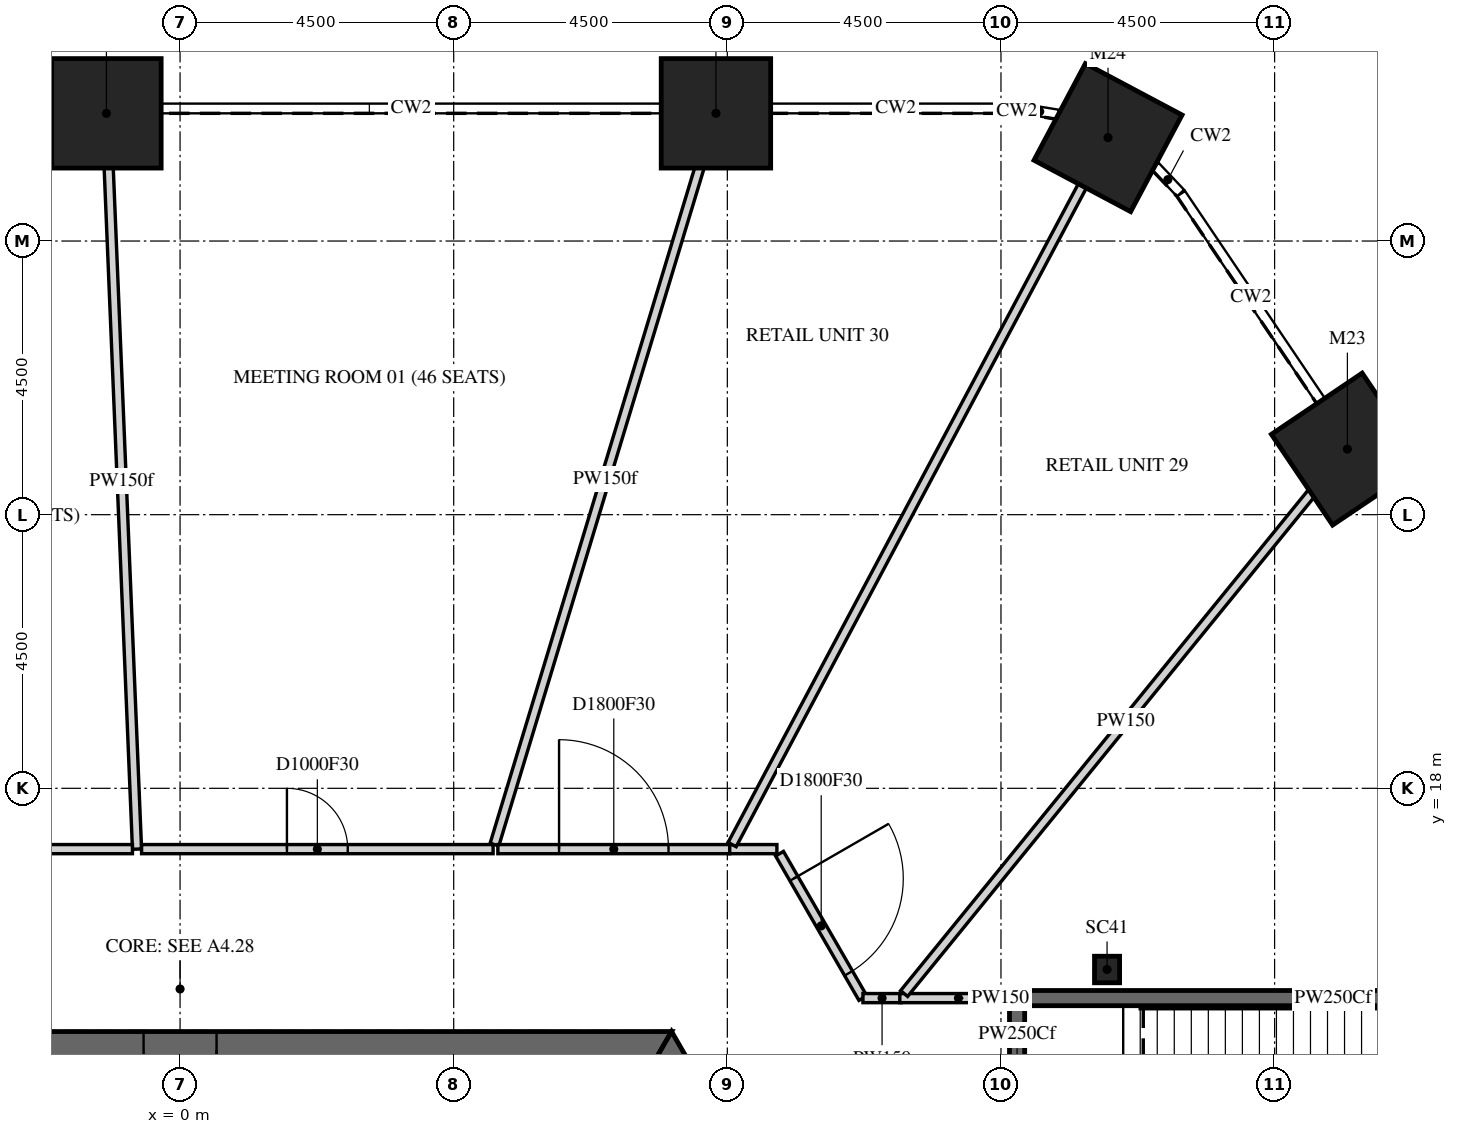
"""IFC4 building model, lengths in metres.
Left out: names, types, materials, properties, quantities, classifications, styles, units other than length and angle.
Written with IfcOpenShell. Run it as: python <this file> out.ifc"""

import sys

from ifc_helpers import new_model, si_unit, direction, frame, frame_2d, origin, origin_2d, place, context, subcontext, project, spatial, polyline, rectangle, i_section, outline, extrude, element, fill, save


model = new_model("IFC4")
c1 = context("Model", 3, precision=1e-05, world=origin(), true_north=direction((0.0, 1.0)))
c2 = subcontext(c1, "Body", "Model", "MODEL_VIEW")
j1 = project(units=[si_unit("LENGTHUNIT", "METRE"), si_unit("PLANEANGLEUNIT", "RADIAN")], contexts=[c1])
p1 = place(None, origin())
s1 = spatial("IfcSite", under=j1, at=p1, CompositionType="ELEMENT")
p2 = place(p1, origin())
s2 = spatial("IfcBuilding", under=s1, at=p2, CompositionType="ELEMENT")
p3 = place(p2, frame((0.0, 0.0, 15.0)))
s3 = spatial("IfcBuildingStorey", under=s2, at=p3, CompositionType="ELEMENT", Elevation=15.0)
for number, where, z_axis, x_axis in (
    (1, (8.812, 29.1, -0.25), (0.0, 0.0, 1.0), (1.0, 0.0, 0.0)),
    (2, (-1.211, 29.1, -0.25), (0.0, 0.0, 1.0), (1.0, 0.0, 0.0)),
    (3, (19.197, 23.579, -0.25), (0.0, 0.0, 1.0), (0.559, -0.829, 0.0)),
    (4, (15.26, 28.701, -0.25), (0.0, 0.0, 1.0), (0.883, -0.469, 0.0)),
):
    element("IfcColumn", number, at=place(p3, frame(where, z_axis=z_axis, x_axis=x_axis)), inside=s3, PredefinedType="COLUMN", context=c2, shape_type="SweptSolid", body=[
        extrude(rectangle(XDim=1.8, YDim=1.8, at=origin_2d()), origin(), (0.0, 0.0, 1.0), 5.5),
    ])
p4 = place(p3, frame((15.245, 15.02, -0.25), z_axis=(0.0, 0.0, 1.0), x_axis=(1.0, 0.0, 0.0)))
e5 = element("IfcColumn", 5, at=p4, inside=s3, PredefinedType="COLUMN", context=c2, shape_type="SweptSolid", body=[
    extrude(i_section(OverallWidth=0.412, OverallDepth=0.437, WebThickness=0.036, FlangeThickness=0.058, FilletRadius=0.015, at=origin_2d()), origin(), (0.0, 0.0, 1.0), 5.5),
])
p5 = place(p3, frame((15.819, 0.0, -0.25), z_axis=(0.0, 0.0, 1.0), x_axis=(-0.499999880136, 0.866025472988, 0.0)))
e6 = element("IfcWall", 6, at=p5, inside=s3, PredefinedType="SHEAR", context=c2, shape_type="SweptSolid", body=[
    extrude(outline(polyline([(-0.173, -0.3), (15.993, -0.3), (15.646, 0.3), (0.173, 0.3), (-0.173, -0.3)])), origin(), (0.0, 0.0, 1.0), 5.5),
])
p6 = place(p5, frame((6.981, 0.0, 0.25)))
e7 = element("IfcOpeningElement", 7, at=p6, cuts=e6, PredefinedType="OPENING", context=c2, shape_type="SweptSolid", body=[
    extrude(rectangle(XDim=1.8, YDim=2.4, at=frame_2d((0.9, 1.2))), frame((0.0, 0.31, 0.0), z_axis=(0.0, -1.0, 0.0), x_axis=(1.0, 0.0, 0.0)), (0.0, 0.0, 1.0), 0.62),
])
p7 = place(p3, frame((7.91, 13.7, -0.25), z_axis=(0.0, 0.0, 1.0), x_axis=(-1.0, 0.0, 0.0)))
e8 = element("IfcWall", 8, at=p7, inside=s3, PredefinedType="SHEAR", context=c2, shape_type="SweptSolid", body=[
    extrude(outline(polyline([(-0.173, -0.3), (15.993, -0.3), (15.646, 0.3), (0.173, 0.3), (-0.173, -0.3)])), origin(), (0.0, 0.0, 1.0), 5.5),
])
p8 = place(p7, frame((7.31, 0.0, 0.25)))
e9 = element("IfcOpeningElement", 9, at=p8, cuts=e8, PredefinedType="OPENING", context=c2, shape_type="SweptSolid", body=[
    extrude(rectangle(XDim=1.2, YDim=2.4, at=frame_2d((0.6, 1.2))), frame((0.0, 0.31, 0.0), z_axis=(0.0, -1.0, 0.0), x_axis=(1.0, 0.0, 0.0)), (0.0, 0.0, 1.0), 0.62),
])
p9 = place(p3, frame((-1.211, 29.1, 0.0), z_axis=(0.0, 0.0, 1.0), x_axis=(0.041528245439, -0.999137330316, 0.0)))
e10 = element("IfcWall", 10, at=p9, inside=s3, PredefinedType="PARTITIONING", context=c2, shape_type="SweptSolid", body=[
    extrude(rectangle(XDim=12.111, YDim=0.15, at=frame_2d((6.055, 0.0))), origin(), (0.0, 0.0, 1.0), 4.496),
])
p10 = place(p3, frame((-6.563, 17.0, 0.0), z_axis=(0.0, 0.0, 1.0), x_axis=(1.0, 0.0, 0.0)))
e11 = element("IfcWall", 11, at=p10, inside=s3, PredefinedType="PARTITIONING", context=c2, shape_type="SweptSolid", body=[
    extrude(rectangle(XDim=5.78, YDim=0.15, at=frame_2d((2.89, 0.0))), origin(), (0.0, 0.0, 1.0), 5.25),
])
p11 = place(p10, frame((2.39, 0.0, 0.0)))
e12 = element("IfcOpeningElement", 12, at=p11, cuts=e11, PredefinedType="OPENING", context=c2, shape_type="SweptSolid", body=[
    extrude(rectangle(XDim=1.0, YDim=2.1, at=frame_2d((0.5, 1.05))), frame((0.0, 0.085, 0.0), z_axis=(0.0, -1.0, 0.0), x_axis=(1.0, 0.0, 0.0)), (0.0, 0.0, 1.0), 0.17),
])
p12 = place(p3, frame((-0.633, 17.0, 0.0), z_axis=(0.0, 0.0, 1.0), x_axis=(1.0, 0.0, 0.0)))
e13 = element("IfcWall", 13, at=p12, inside=s3, PredefinedType="PARTITIONING", context=c2, shape_type="SweptSolid", body=[
    extrude(rectangle(XDim=5.781, YDim=0.15, at=frame_2d((2.891, 0.0))), origin(), (0.0, 0.0, 1.0), 5.25),
])
p13 = place(p12, frame((2.39, 0.0, 0.0)))
e14 = element("IfcOpeningElement", 14, at=p13, cuts=e13, PredefinedType="OPENING", context=c2, shape_type="SweptSolid", body=[
    extrude(rectangle(XDim=1.0, YDim=2.1, at=frame_2d((0.5, 1.05))), frame((0.0, 0.085, 0.0), z_axis=(0.0, -1.0, 0.0), x_axis=(1.0, 0.0, 0.0)), (0.0, 0.0, 1.0), 0.17),
])
p14 = place(p3, frame((5.171, 17.075, 0.0), z_axis=(0.0, 0.0, 1.0), x_axis=(0.289887131616, 0.957060839719, 0.0)))
e15 = element("IfcWall", 15, at=p14, inside=s3, PredefinedType="PARTITIONING", context=c2, shape_type="SweptSolid", body=[
    extrude(rectangle(XDim=12.565, YDim=0.15, at=frame_2d((6.282, 0.0))), origin(), (0.0, 0.0, 1.0), 4.496),
])
p15 = place(p3, frame((5.226, 17.0, 0.0), z_axis=(0.0, 0.0, 1.0), x_axis=(1.0, 0.0, 0.0)))
e16 = element("IfcWall", 16, at=p15, inside=s3, PredefinedType="PARTITIONING", context=c2, shape_type="SweptSolid", body=[
    extrude(rectangle(XDim=3.813, YDim=0.15, at=frame_2d((1.906, 0.0))), origin(), (0.0, 0.0, 1.0), 5.25),
])
p16 = place(p15, frame((1.006, 0.0, 0.0)))
e17 = element("IfcOpeningElement", 17, at=p16, cuts=e16, PredefinedType="OPENING", context=c2, shape_type="SweptSolid", body=[
    extrude(rectangle(XDim=1.8, YDim=2.1, at=frame_2d((0.9, 1.05))), frame((0.0, 0.085, 0.0), z_axis=(0.0, -1.0, 0.0), x_axis=(1.0, 0.0, 0.0)), (0.0, 0.0, 1.0), 0.17),
])
p17 = place(p3, frame((9.815, 17.0, 0.0), z_axis=(0.0, 0.0, 1.0), x_axis=(-1.0, 0.0, 0.0)))
e18 = element("IfcWall", 18, at=p17, inside=s3, PredefinedType="PARTITIONING", context=c2, shape_type="SweptSolid", body=[
    extrude(rectangle(XDim=0.776, YDim=0.15, at=frame_2d((0.388, 0.0))), origin(), (0.0, 0.0, 1.0), 5.25),
])
p18 = place(p3, frame((9.858, 16.925, 0.0), z_axis=(0.0, 0.0, 1.0), x_axis=(0.499835495421, -0.866120359718, 0.0)))
e19 = element("IfcWall", 19, at=p18, inside=s3, PredefinedType="PARTITIONING", context=c2, shape_type="SweptSolid", body=[
    extrude(rectangle(XDim=2.742, YDim=0.15, at=frame_2d((1.371, 0.0))), origin(), (0.0, 0.0, 1.0), 5.25),
])
p19 = place(p18, frame((0.471, 0.0, 0.0)))
e20 = element("IfcOpeningElement", 20, at=p19, cuts=e19, PredefinedType="OPENING", context=c2, shape_type="SweptSolid", body=[
    extrude(rectangle(XDim=1.8, YDim=2.1, at=frame_2d((0.9, 1.05))), frame((0.0, 0.085, 0.0), z_axis=(0.0, -1.0, 0.0), x_axis=(1.0, 0.0, 0.0)), (0.0, 0.0, 1.0), 0.17),
])
p20 = place(p3, frame((11.23, 14.55, 0.0), z_axis=(0.0, 0.0, 1.0), x_axis=(1.0, 0.0, 0.0)))
e21 = element("IfcWall", 21, at=p20, inside=s3, PredefinedType="PARTITIONING", context=c2, shape_type="SweptSolid", body=[
    extrude(rectangle(XDim=0.629, YDim=0.15, at=frame_2d((0.314, 0.0))), origin(), (0.0, 0.0, 1.0), 5.25),
])
p21 = place(p3, frame((11.836, 14.55, 0.0), z_axis=(0.0, 0.0, 1.0), x_axis=(1.0, 0.0, 0.0)))
e22 = element("IfcWall", 22, at=p21, inside=s3, PredefinedType="PARTITIONING", context=c2, shape_type="SweptSolid", body=[
    extrude(rectangle(XDim=1.929, YDim=0.15, at=frame_2d((0.964, 0.0))), origin(), (0.0, 0.0, 1.0), 5.25),
])
p22 = place(p3, frame((13.765, 11.425, 0.0), z_axis=(0.0, 0.0, 1.0), x_axis=(0.0, 1.0, 0.0)))
e23 = element("IfcWall", 23, at=p22, inside=s3, PredefinedType="PARTITIONING", context=c2, shape_type="SweptSolid", body=[
    extrude(rectangle(XDim=3.05, YDim=0.25, at=frame_2d((1.525, 0.0))), origin(), (0.0, 0.0, 1.0), 4.496),
])
p23 = place(p22, frame((0.925, 0.0, 0.0)))
e24 = element("IfcOpeningElement", 24, at=p23, cuts=e23, PredefinedType="OPENING", context=c2, shape_type="SweptSolid", body=[
    extrude(rectangle(XDim=1.2, YDim=2.1, at=frame_2d((0.6, 1.05))), frame((0.0, 0.135, 0.0), z_axis=(0.0, -1.0, 0.0), x_axis=(1.0, 0.0, 0.0)), (0.0, 0.0, 1.0), 0.27),
])
p24 = place(p3, frame((13.89, 14.55, 0.0), z_axis=(0.0, 0.0, 1.0), x_axis=(1.0, 0.0, 0.0)))
e25 = element("IfcWall", 25, at=p24, inside=s3, PredefinedType="PARTITIONING", context=c2, shape_type="SweptSolid", body=[
    extrude(rectangle(XDim=10.145, YDim=0.25, at=frame_2d((5.073, 0.0))), origin(), (0.0, 0.0, 1.0), 4.496),
])
p25 = place(p3, frame((15.261, 28.701, 0.0), z_axis=(0.0, 0.0, 1.0), x_axis=(-0.469500426527, -0.882932245131, 0.0)))
e26 = element("IfcWall", 26, at=p25, inside=s3, PredefinedType="PARTITIONING", context=c2, shape_type="SweptSolid", body=[
    extrude(rectangle(XDim=13.167, YDim=0.15, at=frame_2d((6.584, 0.0))), origin(), (0.0, 0.0, 1.0), 4.488),
])
p26 = place(p3, frame((19.197, 23.578, 0.0), z_axis=(0.0, 0.0, 1.0), x_axis=(-0.631417805909, -0.775442811805, 0.0)))
e27 = element("IfcWall", 27, at=p26, inside=s3, PredefinedType="PARTITIONING", context=c2, shape_type="SweptSolid", body=[
    extrude(rectangle(XDim=11.545, YDim=0.15, at=frame_2d((5.773, 0.0))), origin(), (0.0, 0.0, 1.0), 5.25),
])
p27 = place(p8, origin())
e28 = element("IfcDoor", 28, at=p27, inside=s3, OperationType="SINGLE_SWING_LEFT", PredefinedType="DOOR", context=c2, shape_type="SweptSolid", body=[
    extrude(rectangle(XDim=1.2, YDim=2.4, at=frame_2d((0.6, 1.2))), frame((0.0, 0.025, 0.0), z_axis=(0.0, -1.0, 0.0), x_axis=(1.0, 0.0, 0.0)), (0.0, 0.0, 1.0), 0.05),
])
fill(e9, e28)
p28 = place(p13, origin())
e29 = element("IfcDoor", 29, at=p28, inside=s3, OperationType="SINGLE_SWING_RIGHT", PredefinedType="DOOR", context=c2, shape_type="SweptSolid", body=[
    extrude(rectangle(XDim=1.0, YDim=2.1, at=frame_2d((0.5, 1.05))), frame((0.0, 0.025, 0.0), z_axis=(0.0, -1.0, 0.0), x_axis=(1.0, 0.0, 0.0)), (0.0, 0.0, 1.0), 0.05),
])
fill(e14, e29)
p29 = place(p16, origin())
e30 = element("IfcDoor", 30, at=p29, inside=s3, OperationType="DOUBLE_DOOR_SINGLE_SWING", PredefinedType="DOOR", context=c2, shape_type="SweptSolid", body=[
    extrude(rectangle(XDim=1.8, YDim=2.1, at=frame_2d((0.9, 1.05))), frame((0.0, 0.025, 0.0), z_axis=(0.0, -1.0, 0.0), x_axis=(1.0, 0.0, 0.0)), (0.0, 0.0, 1.0), 0.05),
])
fill(e17, e30)
p30 = place(p19, origin())
e31 = element("IfcDoor", 31, at=p30, inside=s3, OperationType="DOUBLE_DOOR_SINGLE_SWING", PredefinedType="DOOR", context=c2, shape_type="SweptSolid", body=[
    extrude(rectangle(XDim=1.8, YDim=2.1, at=frame_2d((0.9, 1.05))), frame((0.0, 0.025, 0.0), z_axis=(0.0, -1.0, 0.0), x_axis=(1.0, 0.0, 0.0)), (0.0, 0.0, 1.0), 0.05),
])
fill(e20, e31)
save(model, sys.argv[1])
